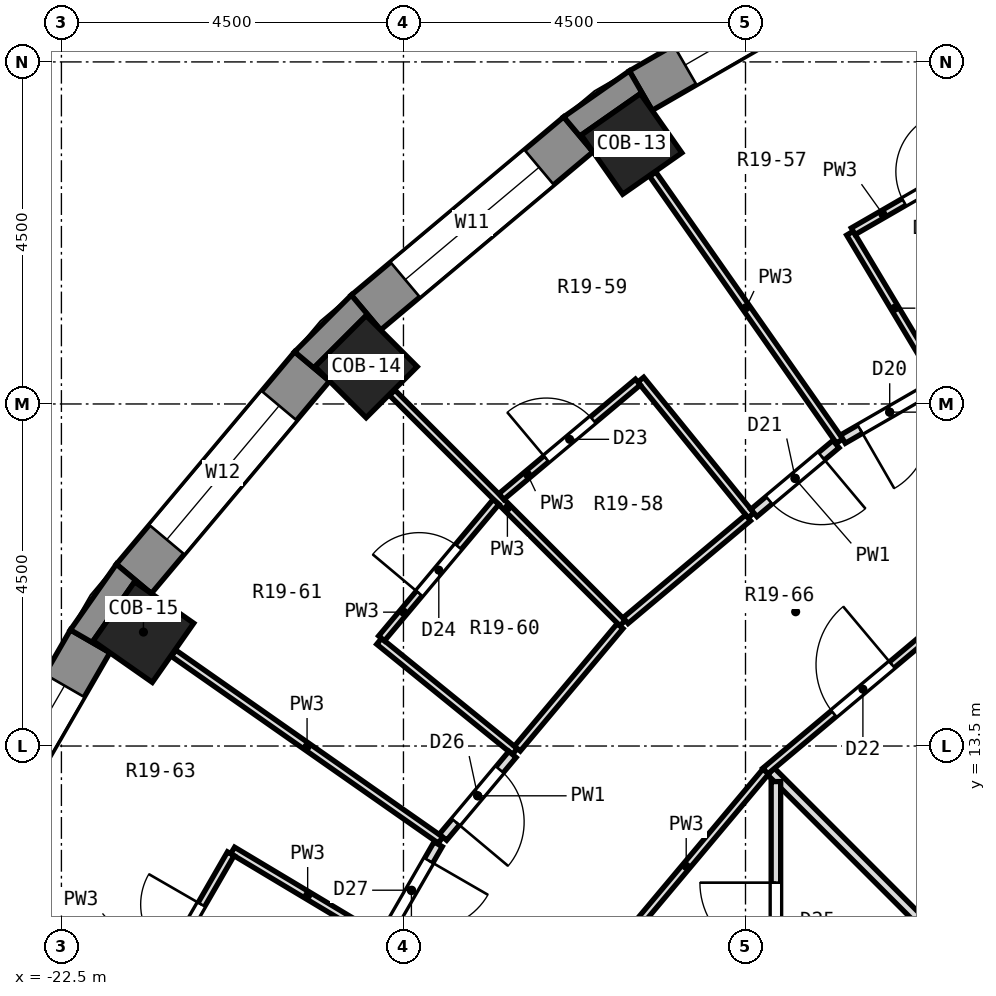
"""IFC4 building model, lengths in metres.
Left out: names, types, materials, properties, quantities, classifications, styles, units other than length and angle.
Written with IfcOpenShell. Run it as: python <this file> out.ifc"""

import sys

from ifc_helpers import new_model, si_unit, direction, frame, frame_2d, origin, origin_2d, place, context, subcontext, project, spatial, polyline, rectangle, outline, extrude, element, fill, save


model = new_model("IFC4")
c1 = context("Model", 3, precision=1e-05, world=origin(), true_north=direction((0.0, 1.0)))
c2 = subcontext(c1, "Body", "Model", "MODEL_VIEW")
j1 = project(units=[si_unit("LENGTHUNIT", "METRE"), si_unit("PLANEANGLEUNIT", "RADIAN")], contexts=[c1])
p1 = place(None, origin())
s1 = spatial("IfcSite", under=j1, at=p1, CompositionType="ELEMENT")
p2 = place(p1, origin())
s2 = spatial("IfcBuilding", under=s1, at=p2, CompositionType="ELEMENT")
p3 = place(p2, frame((0.0, 0.0, 111.7)))
s3 = spatial("IfcBuildingStorey", under=s2, at=p3, CompositionType="ELEMENT", Elevation=111.7)
for number, where, z_axis, x_axis in (
    (1, (-14.999, 21.421, 0.0), (0.0, 0.0, 1.0), (-0.574, 0.819, 0.0)),
    (2, (-18.491, 18.491, 0.0), (0.0, 0.0, 1.0), (-0.707, 0.707, 0.0)),
    (3, (-21.421, 14.999, 0.0), (0.0, 0.0, 1.0), (-0.819, 0.574, 0.0)),
):
    element("IfcColumn", number, at=place(p3, frame(where, z_axis=z_axis, x_axis=x_axis)), inside=s3, PredefinedType="COLUMN", context=c2, shape_type="SweptSolid", body=[
        extrude(rectangle(XDim=0.95, YDim=0.95, at=origin_2d()), origin(), (0.0, 0.0, 1.0), 3.3),
    ])
p4 = place(p3, frame((-11.719, 23.946, 0.0), z_axis=(0.0, 0.0, 1.0), x_axis=(-0.866051847062, -0.499954196102, 0.0)))
e4 = element("IfcWall", 4, at=p4, inside=s3, PredefinedType="SOLIDWALL", context=c2, shape_type="SweptSolid", body=[
    extrude(rectangle(XDim=3.648, YDim=0.6, at=frame_2d((1.824, 0.0))), origin(), (0.0, 0.0, 1.0), 2.8),
])
p5 = place(p4, frame((0.674, 0.0, 0.9)))
e5 = element("IfcOpeningElement", 5, at=p5, cuts=e4, PredefinedType="OPENING", context=c2, shape_type="SweptSolid", body=[
    extrude(rectangle(XDim=2.3, YDim=1.8, at=frame_2d((1.15, 0.9))), frame((0.0, 0.312, 0.0), z_axis=(0.0, -1.0, 0.0), x_axis=(1.0, 0.0, 0.0)), (0.0, 0.0, 1.0), 0.624),
])
p6 = place(p3, frame((-15.699, 21.547, 0.0), z_axis=(0.0, 0.0, 1.0), x_axis=(-0.766055462616, -0.642774476932, 0.0)))
e6 = element("IfcWall", 6, at=p6, inside=s3, PredefinedType="SOLIDWALL", context=c2, shape_type="SweptSolid", body=[
    extrude(rectangle(XDim=3.648, YDim=0.6, at=frame_2d((1.824, 0.0))), origin(), (0.0, 0.0, 1.0), 2.8),
])
p7 = place(p6, frame((0.674, 0.0, 0.9)))
e7 = element("IfcOpeningElement", 7, at=p7, cuts=e6, PredefinedType="OPENING", context=c2, shape_type="SweptSolid", body=[
    extrude(rectangle(XDim=2.3, YDim=1.8, at=frame_2d((1.15, 0.9))), frame((0.0, 0.312, 0.0), z_axis=(0.0, -1.0, 0.0), x_axis=(1.0, 0.0, 0.0)), (0.0, 0.0, 1.0), 0.624),
])
p8 = place(p3, frame((-19.202, 18.494, 0.0), z_axis=(0.0, 0.0, 1.0), x_axis=(-0.642774476932, -0.766055462616, 0.0)))
e8 = element("IfcWall", 8, at=p8, inside=s3, PredefinedType="SOLIDWALL", context=c2, shape_type="SweptSolid", body=[
    extrude(rectangle(XDim=3.648, YDim=0.6, at=frame_2d((1.824, 0.0))), origin(), (0.0, 0.0, 1.0), 2.8),
])
p9 = place(p8, frame((0.674, 0.0, 0.9)))
e9 = element("IfcOpeningElement", 9, at=p9, cuts=e8, PredefinedType="OPENING", context=c2, shape_type="SweptSolid", body=[
    extrude(rectangle(XDim=2.3, YDim=1.8, at=frame_2d((1.15, 0.9))), frame((0.0, 0.312, 0.0), z_axis=(0.0, -1.0, 0.0), x_axis=(1.0, 0.0, 0.0)), (0.0, 0.0, 1.0), 0.624),
])
p10 = place(p3, frame((-22.122, 14.878, 0.0), z_axis=(0.0, 0.0, 1.0), x_axis=(-0.499954196102, -0.866051847062, 0.0)))
e10 = element("IfcWall", 10, at=p10, inside=s3, PredefinedType="SOLIDWALL", context=c2, shape_type="SweptSolid", body=[
    extrude(rectangle(XDim=3.648, YDim=0.6, at=frame_2d((1.824, 0.0))), origin(), (0.0, 0.0, 1.0), 2.8),
])
p11 = place(p10, frame((0.674, 0.0, 0.9)))
e11 = element("IfcOpeningElement", 11, at=p11, cuts=e10, PredefinedType="OPENING", context=c2, shape_type="SweptSolid", body=[
    extrude(rectangle(XDim=2.3, YDim=1.8, at=frame_2d((1.15, 0.9))), frame((0.0, 0.312, 0.0), z_axis=(0.0, -1.0, 0.0), x_axis=(1.0, 0.0, 0.0)), (0.0, 0.0, 1.0), 0.624),
])
p12 = place(p3, origin())
e12 = element("IfcWall", 12, at=p12, inside=s3, PredefinedType="SOLIDWALL", context=c2, shape_type="SweptSolid", body=[
    extrude(outline(polyline([(-15.892, 21.777), (-15.506, 21.317), (-15.661, 21.538), (-14.882, 22.083), (-14.728, 21.862), (-15.028, 22.382), (-15.892, 21.777)])), origin(), (0.0, 0.0, 1.0), 2.8),
])
p13 = place(p3, origin())
e13 = element("IfcWall", 13, at=p13, inside=s3, PredefinedType="SOLIDWALL", context=c2, shape_type="SweptSolid", body=[
    extrude(outline(polyline([(-18.686, 19.432), (-19.432, 18.686), (-18.972, 18.301), (-19.163, 18.491), (-18.491, 19.163), (-18.301, 18.972), (-18.686, 19.432)])), origin(), (0.0, 0.0, 1.0), 2.8),
])
p14 = place(p3, origin())
e14 = element("IfcWall", 14, at=p14, inside=s3, PredefinedType="SOLIDWALL", context=c2, shape_type="SweptSolid", body=[
    extrude(outline(polyline([(-22.382, 15.028), (-21.862, 14.728), (-22.083, 14.882), (-21.538, 15.661), (-21.317, 15.506), (-21.777, 15.892), (-22.382, 15.028)])), origin(), (0.0, 0.0, 1.0), 2.8),
])
p15 = place(p3, frame((-12.126, 20.247, 0.0), z_axis=(0.0, 0.0, 1.0), x_axis=(0.513668498435, -0.857988737522, 0.0)))
e15 = element("IfcWall", 15, at=p15, inside=s3, PredefinedType="PARTITIONING", context=c2, shape_type="SweptSolid", body=[
    extrude(rectangle(XDim=2.301, YDim=0.1, at=frame_2d((1.15, 0.0))), origin(), (0.0, 0.0, 1.0), 2.8),
])
p16 = place(p3, frame((-14.721, 21.024, 0.0), z_axis=(0.0, 0.0, 1.0), x_axis=(0.573546429028, -0.819173054824, 0.0)))
e16 = element("IfcWall", 16, at=p16, inside=s3, PredefinedType="PARTITIONING", context=c2, shape_type="SweptSolid", body=[
    extrude(rectangle(XDim=4.287, YDim=0.1, at=frame_2d((2.144, 0.0))), origin(), (0.0, 0.0, 1.0), 2.8),
])
p17 = place(p3, frame((-14.878, 18.32, 0.0), z_axis=(0.0, 0.0, 1.0), x_axis=(0.630256971768, -0.776386597989, 0.0)))
e17 = element("IfcWall", 17, at=p17, inside=s3, PredefinedType="PARTITIONING", context=c2, shape_type="SweptSolid", body=[
    extrude(rectangle(XDim=2.301, YDim=0.1, at=frame_2d((1.15, 0.0))), origin(), (0.0, 0.0, 1.0), 2.8),
])
p18 = place(p3, frame((-18.148, 18.148, 0.0), z_axis=(0.0, 0.0, 1.0), x_axis=(0.707106781187, -0.707106781187, 0.0)))
e18 = element("IfcWall", 18, at=p18, inside=s3, PredefinedType="PARTITIONING", context=c2, shape_type="SweptSolid", body=[
    extrude(rectangle(XDim=4.286, YDim=0.1, at=frame_2d((2.143, 0.0))), origin(), (0.0, 0.0, 1.0), 2.8),
])
p19 = place(p3, frame((-13.167, 13.167, 0.0), z_axis=(0.0, 0.0, 1.0), x_axis=(0.707106781187, -0.707106781187, 0.0)))
e19 = element("IfcWall", 19, at=p19, inside=s3, PredefinedType="PARTITIONING", context=c2, shape_type="SweptSolid", body=[
    extrude(rectangle(XDim=7.716, YDim=0.125, at=frame_2d((3.858, 0.0))), origin(), (0.0, 0.0, 1.0), 2.8),
])
p20 = place(p3, frame((-18.32, 14.878, 0.0), z_axis=(0.0, 0.0, 1.0), x_axis=(0.776386597989, -0.630256971768, 0.0)))
e20 = element("IfcWall", 20, at=p20, inside=s3, PredefinedType="PARTITIONING", context=c2, shape_type="SweptSolid", body=[
    extrude(rectangle(XDim=2.301, YDim=0.1, at=frame_2d((1.15, 0.0))), origin(), (0.0, 0.0, 1.0), 2.8),
])
p21 = place(p3, frame((-21.024, 14.721, 0.0), z_axis=(0.0, 0.0, 1.0), x_axis=(0.819173054824, -0.573546429028, 0.0)))
e21 = element("IfcWall", 21, at=p21, inside=s3, PredefinedType="PARTITIONING", context=c2, shape_type="SweptSolid", body=[
    extrude(rectangle(XDim=4.287, YDim=0.1, at=frame_2d((2.144, 0.0))), origin(), (0.0, 0.0, 1.0), 2.8),
])
p22 = place(p3, frame((-20.247, 12.126, 0.0), z_axis=(0.0, 0.0, 1.0), x_axis=(0.857988737522, -0.513668498435, 0.0)))
e22 = element("IfcWall", 22, at=p22, inside=s3, PredefinedType="PARTITIONING", context=c2, shape_type="SweptSolid", body=[
    extrude(rectangle(XDim=2.301, YDim=0.1, at=frame_2d((1.15, 0.0))), origin(), (0.0, 0.0, 1.0), 2.8),
])
p23 = place(p3, frame((-12.219, 17.537, 0.0), z_axis=(0.0, 0.0, 1.0), x_axis=(0.866036909293, 0.499980071345, 0.0)))
e23 = element("IfcWall", 23, at=p23, inside=s3, PredefinedType="PARTITIONING", context=c2, shape_type="SweptSolid", body=[
    extrude(rectangle(XDim=1.422, YDim=0.125, at=frame_2d((0.711, 0.0))), origin(), (0.0, 0.0, 1.0), 2.8),
])
p24 = place(p23, frame((0.261, 0.0, 0.0)))
e24 = element("IfcOpeningElement", 24, at=p24, cuts=e23, PredefinedType="OPENING", context=c2, shape_type="SweptSolid", body=[
    extrude(rectangle(XDim=0.9, YDim=2.1, at=frame_2d((0.45, 1.05))), frame((0.0, 0.074, 0.0), z_axis=(0.0, -1.0, 0.0), x_axis=(1.0, 0.0, 0.0)), (0.0, 0.0, 1.0), 0.149),
])
p25 = place(p3, frame((-12.083, 20.272, 0.0), z_axis=(0.0, 0.0, 1.0), x_axis=(0.86603458294, 0.499984100898, 0.0)))
e25 = element("IfcWall", 25, at=p25, inside=s3, PredefinedType="PARTITIONING", context=c2, shape_type="SweptSolid", body=[
    extrude(rectangle(XDim=2.342, YDim=0.1, at=frame_2d((1.171, 0.0))), origin(), (0.0, 0.0, 1.0), 2.8),
])
p26 = place(p25, frame((0.771, 0.0, 0.0)))
e26 = element("IfcOpeningElement", 26, at=p26, cuts=e25, PredefinedType="OPENING", context=c2, shape_type="SweptSolid", body=[
    extrude(rectangle(XDim=0.8, YDim=2.1, at=frame_2d((0.4, 1.05))), frame((0.0, 0.062, 0.0), z_axis=(0.0, -1.0, 0.0), x_axis=(1.0, 0.0, 0.0)), (0.0, 0.0, 1.0), 0.124),
])
p27 = place(p3, frame((-13.241, 13.169, 0.0), z_axis=(0.0, 0.0, 1.0), x_axis=(0.766028328168, 0.642806814248, 0.0)))
e27 = element("IfcWall", 27, at=p27, inside=s3, PredefinedType="PARTITIONING", context=c2, shape_type="SweptSolid", body=[
    extrude(rectangle(XDim=3.255, YDim=0.1, at=frame_2d((1.628, 0.0))), origin(), (0.0, 0.0, 1.0), 2.8),
])
p28 = place(p27, frame((1.178, 0.0, 0.0)))
e28 = element("IfcOpeningElement", 28, at=p28, cuts=e27, PredefinedType="OPENING", context=c2, shape_type="SweptSolid", body=[
    extrude(rectangle(XDim=1.0, YDim=2.1, at=frame_2d((0.5, 1.05))), frame((0.0, 0.062, 0.0), z_axis=(0.0, -1.0, 0.0), x_axis=(1.0, 0.0, 0.0)), (0.0, 0.0, 1.0), 0.124),
])
p29 = place(p3, frame((-15.078, 15.15, 0.0), z_axis=(0.0, 0.0, 1.0), x_axis=(0.766047733122, 0.642783688793, 0.0)))
e29 = element("IfcWall", 29, at=p29, inside=s3, PredefinedType="PARTITIONING", context=c2, shape_type="SweptSolid", body=[
    extrude(rectangle(XDim=2.104, YDim=0.1, at=frame_2d((1.052, 0.0))), origin(), (0.0, 0.0, 1.0), 2.8),
])
p30 = place(p3, frame((-13.39, 16.566, 0.0), z_axis=(0.0, 0.0, 1.0), x_axis=(0.766158527395, 0.642651624833, 0.0)))
e30 = element("IfcWall", 30, at=p30, inside=s3, PredefinedType="PARTITIONING", context=c2, shape_type="SweptSolid", body=[
    extrude(rectangle(XDim=1.409, YDim=0.125, at=frame_2d((0.705, 0.0))), origin(), (0.0, 0.0, 1.0), 2.8),
])
p31 = place(p30, frame((0.261, 0.0, 0.0)))
e31 = element("IfcOpeningElement", 31, at=p31, cuts=e30, PredefinedType="OPENING", context=c2, shape_type="SweptSolid", body=[
    extrude(rectangle(XDim=0.9, YDim=2.1, at=frame_2d((0.45, 1.05))), frame((0.0, 0.074, 0.0), z_axis=(0.0, -1.0, 0.0), x_axis=(1.0, 0.0, 0.0)), (0.0, 0.0, 1.0), 0.149),
])
p32 = place(p3, frame((-16.712, 16.782, 0.0), z_axis=(0.0, 0.0, 1.0), x_axis=(0.766236222747, 0.642558986359, 0.0)))
e32 = element("IfcWall", 32, at=p32, inside=s3, PredefinedType="PARTITIONING", context=c2, shape_type="SweptSolid", body=[
    extrude(rectangle(XDim=2.343, YDim=0.1, at=frame_2d((1.172, 0.0))), origin(), (0.0, 0.0, 1.0), 2.8),
])
p33 = place(p32, frame((0.771, 0.0, 0.0)))
e33 = element("IfcOpeningElement", 33, at=p33, cuts=e32, PredefinedType="OPENING", context=c2, shape_type="SweptSolid", body=[
    extrude(rectangle(XDim=0.8, YDim=2.1, at=frame_2d((0.4, 1.05))), frame((0.0, 0.062, 0.0), z_axis=(0.0, -1.0, 0.0), x_axis=(1.0, 0.0, 0.0)), (0.0, 0.0, 1.0), 0.124),
])
p34 = place(p3, frame((-15.327, 10.67, 0.0), z_axis=(0.0, 0.0, 1.0), x_axis=(0.642806814248, 0.766028328168, 0.0)))
e34 = element("IfcWall", 34, at=p34, inside=s3, PredefinedType="PARTITIONING", context=c2, shape_type="SweptSolid", body=[
    extrude(rectangle(XDim=3.255, YDim=0.1, at=frame_2d((1.628, 0.0))), origin(), (0.0, 0.0, 1.0), 2.8),
])
p35 = place(p3, frame((-16.502, 13.466, 0.0), z_axis=(0.0, 0.0, 1.0), x_axis=(0.642783688793, 0.766047733122, 0.0)))
e35 = element("IfcWall", 35, at=p35, inside=s3, PredefinedType="PARTITIONING", context=c2, shape_type="SweptSolid", body=[
    extrude(rectangle(XDim=2.104, YDim=0.1, at=frame_2d((1.052, 0.0))), origin(), (0.0, 0.0, 1.0), 2.8),
])
p36 = place(p3, frame((-17.48, 12.3, 0.0), z_axis=(0.0, 0.0, 1.0), x_axis=(0.642680541645, 0.766134271124, 0.0)))
e36 = element("IfcWall", 36, at=p36, inside=s3, PredefinedType="PARTITIONING", context=c2, shape_type="SweptSolid", body=[
    extrude(rectangle(XDim=1.422, YDim=0.125, at=frame_2d((0.711, 0.0))), origin(), (0.0, 0.0, 1.0), 2.8),
])
p37 = place(p36, frame((0.261, 0.0, 0.0)))
e37 = element("IfcOpeningElement", 37, at=p37, cuts=e36, PredefinedType="OPENING", context=c2, shape_type="SweptSolid", body=[
    extrude(rectangle(XDim=0.9, YDim=2.1, at=frame_2d((0.45, 1.05))), frame((0.0, 0.074, 0.0), z_axis=(0.0, -1.0, 0.0), x_axis=(1.0, 0.0, 0.0)), (0.0, 0.0, 1.0), 0.149),
])
p38 = place(p3, frame((-18.288, 14.916, 0.0), z_axis=(0.0, 0.0, 1.0), x_axis=(0.642558986359, 0.766236222747, 0.0)))
e38 = element("IfcWall", 38, at=p38, inside=s3, PredefinedType="PARTITIONING", context=c2, shape_type="SweptSolid", body=[
    extrude(rectangle(XDim=2.343, YDim=0.1, at=frame_2d((1.172, 0.0))), origin(), (0.0, 0.0, 1.0), 2.8),
])
p39 = place(p38, frame((0.771, 0.0, 0.0)))
e39 = element("IfcOpeningElement", 39, at=p39, cuts=e38, PredefinedType="OPENING", context=c2, shape_type="SweptSolid", body=[
    extrude(rectangle(XDim=0.8, YDim=2.1, at=frame_2d((0.4, 1.05))), frame((0.0, 0.062, 0.0), z_axis=(0.0, -1.0, 0.0), x_axis=(1.0, 0.0, 0.0)), (0.0, 0.0, 1.0), 0.124),
])
p40 = place(p3, frame((-18.248, 10.987, 0.0), z_axis=(0.0, 0.0, 1.0), x_axis=(0.500107311056, 0.865963438852, 0.0)))
e40 = element("IfcWall", 40, at=p40, inside=s3, PredefinedType="PARTITIONING", context=c2, shape_type="SweptSolid", body=[
    extrude(rectangle(XDim=1.409, YDim=0.125, at=frame_2d((0.705, 0.0))), origin(), (0.0, 0.0, 1.0), 2.8),
])
p41 = place(p40, frame((0.261, 0.0, 0.0)))
e41 = element("IfcOpeningElement", 41, at=p41, cuts=e40, PredefinedType="OPENING", context=c2, shape_type="SweptSolid", body=[
    extrude(rectangle(XDim=0.9, YDim=2.1, at=frame_2d((0.45, 1.05))), frame((0.0, 0.074, 0.0), z_axis=(0.0, -1.0, 0.0), x_axis=(1.0, 0.0, 0.0)), (0.0, 0.0, 1.0), 0.149),
])
p42 = place(p3, frame((-21.443, 10.054, 0.0), z_axis=(0.0, 0.0, 1.0), x_axis=(0.499984100898, 0.86603458294, 0.0)))
e42 = element("IfcWall", 42, at=p42, inside=s3, PredefinedType="PARTITIONING", context=c2, shape_type="SweptSolid", body=[
    extrude(rectangle(XDim=2.342, YDim=0.1, at=frame_2d((1.171, 0.0))), origin(), (0.0, 0.0, 1.0), 2.8),
])
p43 = place(p42, frame((0.771, 0.0, 0.0)))
e43 = element("IfcOpeningElement", 43, at=p43, cuts=e42, PredefinedType="OPENING", context=c2, shape_type="SweptSolid", body=[
    extrude(rectangle(XDim=0.8, YDim=2.1, at=frame_2d((0.4, 1.05))), frame((0.0, 0.062, 0.0), z_axis=(0.0, -1.0, 0.0), x_axis=(1.0, 0.0, 0.0)), (0.0, 0.0, 1.0), 0.124),
])
p44 = place(p3, frame((-13.1, 9.4, 0.0), z_axis=(0.0, 0.0, 1.0), x_axis=(0.0, 1.0, 0.0)))
e44 = element("IfcWall", 44, at=p44, inside=s3, PredefinedType="PARTITIONING", context=c2, shape_type="SweptSolid", body=[
    extrude(rectangle(XDim=3.633, YDim=0.125, at=frame_2d((1.816, 0.0))), origin(), (0.0, 0.0, 1.0), 2.8),
])
p45 = place(p44, frame((1.302, 0.0, 0.0)))
e45 = element("IfcOpeningElement", 45, at=p45, cuts=e44, PredefinedType="OPENING", context=c2, shape_type="SweptSolid", body=[
    extrude(rectangle(XDim=1.0, YDim=2.1, at=frame_2d((0.5, 1.05))), frame((0.0, 0.074, 0.0), z_axis=(0.0, -1.0, 0.0), x_axis=(1.0, 0.0, 0.0)), (0.0, 0.0, 1.0), 0.149),
])
p46 = place(p5, origin())
e46 = element("IfcWindow", 46, at=p46, inside=s3, PartitioningType="SINGLE_PANEL", PredefinedType="WINDOW", context=c2, shape_type="SweptSolid", body=[
    extrude(rectangle(XDim=2.3, YDim=1.8, at=frame_2d((1.15, 0.9))), frame((0.0, 0.18, 0.0), z_axis=(0.0, -1.0, 0.0), x_axis=(1.0, 0.0, 0.0)), (0.0, 0.0, 1.0), 0.06),
])
fill(e5, e46)
p47 = place(p7, origin())
e47 = element("IfcWindow", 47, at=p47, inside=s3, PartitioningType="SINGLE_PANEL", PredefinedType="WINDOW", context=c2, shape_type="SweptSolid", body=[
    extrude(rectangle(XDim=2.3, YDim=1.8, at=frame_2d((1.15, 0.9))), frame((0.0, 0.18, 0.0), z_axis=(0.0, -1.0, 0.0), x_axis=(1.0, 0.0, 0.0)), (0.0, 0.0, 1.0), 0.06),
])
fill(e7, e47)
p48 = place(p9, origin())
e48 = element("IfcWindow", 48, at=p48, inside=s3, PartitioningType="SINGLE_PANEL", PredefinedType="WINDOW", context=c2, shape_type="SweptSolid", body=[
    extrude(rectangle(XDim=2.3, YDim=1.8, at=frame_2d((1.15, 0.9))), frame((0.0, 0.18, 0.0), z_axis=(0.0, -1.0, 0.0), x_axis=(1.0, 0.0, 0.0)), (0.0, 0.0, 1.0), 0.06),
])
fill(e9, e48)
p49 = place(p11, origin())
e49 = element("IfcWindow", 49, at=p49, inside=s3, PartitioningType="SINGLE_PANEL", PredefinedType="WINDOW", context=c2, shape_type="SweptSolid", body=[
    extrude(rectangle(XDim=2.3, YDim=1.8, at=frame_2d((1.15, 0.9))), frame((0.0, 0.18, 0.0), z_axis=(0.0, -1.0, 0.0), x_axis=(1.0, 0.0, 0.0)), (0.0, 0.0, 1.0), 0.06),
])
fill(e11, e49)
p50 = place(p26, origin())
e50 = element("IfcDoor", 50, at=p50, inside=s3, OperationType="SINGLE_SWING_RIGHT", PredefinedType="DOOR", context=c2, shape_type="SweptSolid", body=[
    extrude(rectangle(XDim=0.8, YDim=2.1, at=frame_2d((0.4, 1.05))), frame((0.0, 0.025, 0.0), z_axis=(0.0, -1.0, 0.0), x_axis=(1.0, 0.0, 0.0)), (0.0, 0.0, 1.0), 0.05),
])
fill(e26, e50)
p51 = place(p24, frame((0.9, 0.0, 0.0), z_axis=(0.0, 0.0, 1.0), x_axis=(-1.0, 0.0, 0.0)))
e51 = element("IfcDoor", 51, at=p51, inside=s3, OperationType="SINGLE_SWING_RIGHT", PredefinedType="DOOR", context=c2, shape_type="SweptSolid", body=[
    extrude(rectangle(XDim=0.9, YDim=2.1, at=frame_2d((0.45, 1.05))), frame((0.0, 0.025, 0.0), z_axis=(0.0, -1.0, 0.0), x_axis=(1.0, 0.0, 0.0)), (0.0, 0.0, 1.0), 0.05),
])
fill(e24, e51)
p52 = place(p31, frame((0.9, 0.0, 0.0), z_axis=(0.0, 0.0, 1.0), x_axis=(-1.0, 0.0, 0.0)))
e52 = element("IfcDoor", 52, at=p52, inside=s3, OperationType="SINGLE_SWING_LEFT", PredefinedType="DOOR", context=c2, shape_type="SweptSolid", body=[
    extrude(rectangle(XDim=0.9, YDim=2.1, at=frame_2d((0.45, 1.05))), frame((0.0, 0.025, 0.0), z_axis=(0.0, -1.0, 0.0), x_axis=(1.0, 0.0, 0.0)), (0.0, 0.0, 1.0), 0.05),
])
fill(e31, e52)
p53 = place(p28, origin())
e53 = element("IfcDoor", 53, at=p53, inside=s3, OperationType="SINGLE_SWING_RIGHT", PredefinedType="DOOR", context=c2, shape_type="SweptSolid", body=[
    extrude(rectangle(XDim=1.0, YDim=2.1, at=frame_2d((0.5, 1.05))), frame((0.0, 0.025, 0.0), z_axis=(0.0, -1.0, 0.0), x_axis=(1.0, 0.0, 0.0)), (0.0, 0.0, 1.0), 0.05),
])
fill(e28, e53)
p54 = place(p33, origin())
e54 = element("IfcDoor", 54, at=p54, inside=s3, OperationType="SINGLE_SWING_LEFT", PredefinedType="DOOR", context=c2, shape_type="SweptSolid", body=[
    extrude(rectangle(XDim=0.8, YDim=2.1, at=frame_2d((0.4, 1.05))), frame((0.0, 0.025, 0.0), z_axis=(0.0, -1.0, 0.0), x_axis=(1.0, 0.0, 0.0)), (0.0, 0.0, 1.0), 0.05),
])
fill(e33, e54)
p55 = place(p39, origin())
e55 = element("IfcDoor", 55, at=p55, inside=s3, OperationType="SINGLE_SWING_LEFT", PredefinedType="DOOR", context=c2, shape_type="SweptSolid", body=[
    extrude(rectangle(XDim=0.8, YDim=2.1, at=frame_2d((0.4, 1.05))), frame((0.0, 0.025, 0.0), z_axis=(0.0, -1.0, 0.0), x_axis=(1.0, 0.0, 0.0)), (0.0, 0.0, 1.0), 0.05),
])
fill(e39, e55)
p56 = place(p45, origin())
e56 = element("IfcDoor", 56, at=p56, inside=s3, OperationType="SINGLE_SWING_RIGHT", PredefinedType="DOOR", context=c2, shape_type="SweptSolid", body=[
    extrude(rectangle(XDim=1.0, YDim=2.1, at=frame_2d((0.5, 1.05))), frame((0.0, 0.025, 0.0), z_axis=(0.0, -1.0, 0.0), x_axis=(1.0, 0.0, 0.0)), (0.0, 0.0, 1.0), 0.05),
])
fill(e45, e56)
p57 = place(p37, frame((0.9, 0.0, 0.0), z_axis=(0.0, 0.0, 1.0), x_axis=(-1.0, 0.0, 0.0)))
e57 = element("IfcDoor", 57, at=p57, inside=s3, OperationType="SINGLE_SWING_RIGHT", PredefinedType="DOOR", context=c2, shape_type="SweptSolid", body=[
    extrude(rectangle(XDim=0.9, YDim=2.1, at=frame_2d((0.45, 1.05))), frame((0.0, 0.025, 0.0), z_axis=(0.0, -1.0, 0.0), x_axis=(1.0, 0.0, 0.0)), (0.0, 0.0, 1.0), 0.05),
])
fill(e37, e57)
p58 = place(p41, frame((0.9, 0.0, 0.0), z_axis=(0.0, 0.0, 1.0), x_axis=(-1.0, 0.0, 0.0)))
e58 = element("IfcDoor", 58, at=p58, inside=s3, OperationType="SINGLE_SWING_LEFT", PredefinedType="DOOR", context=c2, shape_type="SweptSolid", body=[
    extrude(rectangle(XDim=0.9, YDim=2.1, at=frame_2d((0.45, 1.05))), frame((0.0, 0.025, 0.0), z_axis=(0.0, -1.0, 0.0), x_axis=(1.0, 0.0, 0.0)), (0.0, 0.0, 1.0), 0.05),
])
fill(e41, e58)
p59 = place(p43, origin())
e59 = element("IfcDoor", 59, at=p59, inside=s3, OperationType="SINGLE_SWING_RIGHT", PredefinedType="DOOR", context=c2, shape_type="SweptSolid", body=[
    extrude(rectangle(XDim=0.8, YDim=2.1, at=frame_2d((0.4, 1.05))), frame((0.0, 0.025, 0.0), z_axis=(0.0, -1.0, 0.0), x_axis=(1.0, 0.0, 0.0)), (0.0, 0.0, 1.0), 0.05),
])
fill(e43, e59)
save(model, sys.argv[1])
